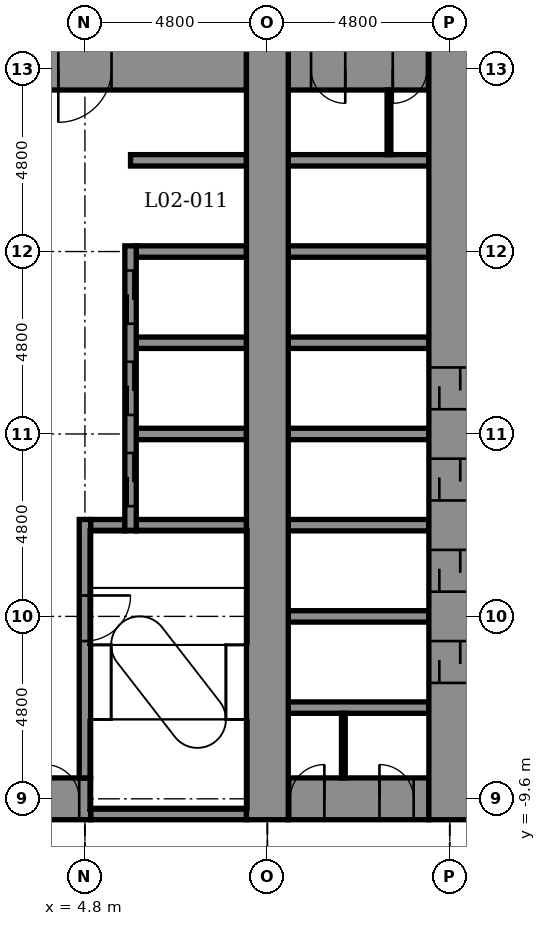
"""IFC4 building model, lengths in metres.
Left out: names, types, materials, properties, quantities, classifications, styles, units other than length and angle.
Written with IfcOpenShell. Run it as: python <this file> out.ifc"""

import sys

from ifc_helpers import new_model, si_unit, direction, frame, frame_2d, origin, place, context, subcontext, project, spatial, rectangle, extrude, element, fill, save


model = new_model("IFC4")
c1 = context("Model", 3, precision=1e-05, world=origin(), true_north=direction((0.0, 1.0)))
c2 = subcontext(c1, "Body", "Model", "MODEL_VIEW")
j1 = project(units=[si_unit("LENGTHUNIT", "METRE"), si_unit("PLANEANGLEUNIT", "RADIAN")], contexts=[c1])
p1 = place(None, origin())
s1 = spatial("IfcSite", under=j1, at=p1, CompositionType="ELEMENT")
p2 = place(p1, origin())
s2 = spatial("IfcBuilding", under=s1, at=p2, CompositionType="ELEMENT")
p3 = place(p2, frame((0.0, 0.0, 12.4)))
s3 = spatial("IfcBuildingStorey", under=s2, at=p3, CompositionType="ELEMENT", Elevation=12.4)
p4 = place(p3, frame((4.95, -10.0, -0.3), z_axis=(0.0, 0.0, 1.0), x_axis=(1.0, 0.0, 0.0)))
e1 = element("IfcWall", 1, at=p4, inside=s3, PredefinedType="STANDARD", context=c2, shape_type="SweptSolid", body=[
    extrude(rectangle(XDim=4.1, YDim=0.3, at=frame_2d((2.05, 0.0))), origin(), (0.0, 0.0, 1.0), 5.05),
])
p5 = place(p3, frame((-5.25, -9.6, -0.3), z_axis=(0.0, 0.0, 1.0), x_axis=(1.0, 0.0, 0.0)))
e2 = element("IfcWall", 2, at=p5, inside=s3, PredefinedType="SHEAR", context=c2, shape_type="SweptSolid", body=[
    extrude(rectangle(XDim=10.2, YDim=1.1, at=frame_2d((5.1, 0.0))), origin(), (0.0, 0.0, 1.0), 5.05),
])
p6 = place(p5, frame((9.0, 0.0, 0.3)))
e3 = element("IfcOpeningElement", 3, at=p6, cuts=e2, PredefinedType="OPENING", context=c2, shape_type="SweptSolid", body=[
    extrude(rectangle(XDim=0.9, YDim=2.1, at=frame_2d((0.45, 1.05))), frame((0.0, 0.56, 0.0), z_axis=(0.0, -1.0, 0.0), x_axis=(1.0, 0.0, 0.0)), (0.0, 0.0, 1.0), 1.12),
])
p7 = place(p3, frame((10.15, -9.6, -0.3), z_axis=(0.0, 0.0, 1.0), x_axis=(1.0, 0.0, 0.0)))
e4 = element("IfcWall", 4, at=p7, inside=s3, PredefinedType="SHEAR", context=c2, shape_type="SweptSolid", body=[
    extrude(rectangle(XDim=3.7, YDim=1.1, at=frame_2d((1.85, 0.0))), origin(), (0.0, 0.0, 1.0), 5.05),
])
p8 = place(p7, frame((0.05, 0.0, 0.3)))
e5 = element("IfcOpeningElement", 5, at=p8, cuts=e4, PredefinedType="OPENING", context=c2, shape_type="SweptSolid", body=[
    extrude(rectangle(XDim=0.9, YDim=2.1, at=frame_2d((0.45, 1.05))), frame((0.0, 0.56, 0.0), z_axis=(0.0, -1.0, 0.0), x_axis=(1.0, 0.0, 0.0)), (0.0, 0.0, 1.0), 1.12),
])
p9 = place(p7, frame((2.4, 0.0, 0.3)))
e6 = element("IfcOpeningElement", 6, at=p9, cuts=e4, PredefinedType="OPENING", context=c2, shape_type="SweptSolid", body=[
    extrude(rectangle(XDim=0.9, YDim=2.1, at=frame_2d((0.45, 1.05))), frame((0.0, 0.56, 0.0), z_axis=(0.0, -1.0, 0.0), x_axis=(1.0, 0.0, 0.0)), (0.0, 0.0, 1.0), 1.12),
])
for number, where, z_axis, x_axis in (
    (7, (10.15, -7.2, -0.3), (0.0, 0.0, 1.0), (1.0, 0.0, 0.0)),
    (8, (10.15, -4.8, -0.3), (0.0, 0.0, 1.0), (1.0, 0.0, 0.0)),
):
    element("IfcWall", number, at=place(p3, frame(where, z_axis=z_axis, x_axis=x_axis)), inside=s3, PredefinedType="STANDARD", context=c2, shape_type="SweptSolid", body=[
        extrude(rectangle(XDim=3.7, YDim=0.3, at=frame_2d((1.85, 0.0))), origin(), (0.0, 0.0, 1.0), 5.05),
    ])
p10 = place(p3, frame((4.95, -2.4, -0.3), z_axis=(0.0, 0.0, 1.0), x_axis=(1.0, 0.0, 0.0)))
e9 = element("IfcWall", 9, at=p10, inside=s3, PredefinedType="STANDARD", context=c2, shape_type="SweptSolid", body=[
    extrude(rectangle(XDim=0.9, YDim=0.3, at=frame_2d((0.45, 0.0))), origin(), (0.0, 0.0, 1.0), 5.05),
])
p11 = place(p3, frame((6.15, -2.4, -0.3), z_axis=(0.0, 0.0, 1.0), x_axis=(1.0, 0.0, 0.0)))
e10 = element("IfcWall", 10, at=p11, inside=s3, PredefinedType="STANDARD", context=c2, shape_type="SweptSolid", body=[
    extrude(rectangle(XDim=2.9, YDim=0.3, at=frame_2d((1.45, 0.0))), origin(), (0.0, 0.0, 1.0), 5.05),
])
p12 = place(p3, frame((10.15, -2.4, -0.3), z_axis=(0.0, 0.0, 1.0), x_axis=(1.0, 0.0, 0.0)))
e11 = element("IfcWall", 11, at=p12, inside=s3, PredefinedType="STANDARD", context=c2, shape_type="SweptSolid", body=[
    extrude(rectangle(XDim=3.7, YDim=0.3, at=frame_2d((1.85, 0.0))), origin(), (0.0, 0.0, 1.0), 5.05),
])
p13 = place(p3, frame((6.15, 0.0, -0.3), z_axis=(0.0, 0.0, 1.0), x_axis=(1.0, 0.0, 0.0)))
e12 = element("IfcWall", 12, at=p13, inside=s3, PredefinedType="STANDARD", context=c2, shape_type="SweptSolid", body=[
    extrude(rectangle(XDim=2.9, YDim=0.3, at=frame_2d((1.45, 0.0))), origin(), (0.0, 0.0, 1.0), 5.05),
])
p14 = place(p3, frame((10.15, 0.0, -0.3), z_axis=(0.0, 0.0, 1.0), x_axis=(1.0, 0.0, 0.0)))
e13 = element("IfcWall", 13, at=p14, inside=s3, PredefinedType="STANDARD", context=c2, shape_type="SweptSolid", body=[
    extrude(rectangle(XDim=3.7, YDim=0.3, at=frame_2d((1.85, 0.0))), origin(), (0.0, 0.0, 1.0), 5.05),
])
p15 = place(p3, frame((6.15, 2.4, -0.3), z_axis=(0.0, 0.0, 1.0), x_axis=(1.0, 0.0, 0.0)))
e14 = element("IfcWall", 14, at=p15, inside=s3, PredefinedType="STANDARD", context=c2, shape_type="SweptSolid", body=[
    extrude(rectangle(XDim=2.9, YDim=0.3, at=frame_2d((1.45, 0.0))), origin(), (0.0, 0.0, 1.0), 5.05),
])
p16 = place(p3, frame((10.15, 2.4, -0.3), z_axis=(0.0, 0.0, 1.0), x_axis=(1.0, 0.0, 0.0)))
e15 = element("IfcWall", 15, at=p16, inside=s3, PredefinedType="STANDARD", context=c2, shape_type="SweptSolid", body=[
    extrude(rectangle(XDim=3.7, YDim=0.3, at=frame_2d((1.85, 0.0))), origin(), (0.0, 0.0, 1.0), 5.05),
])
p17 = place(p3, frame((6.15, 4.8, -0.3), z_axis=(0.0, 0.0, 1.0), x_axis=(1.0, 0.0, 0.0)))
e16 = element("IfcWall", 16, at=p17, inside=s3, PredefinedType="STANDARD", context=c2, shape_type="SweptSolid", body=[
    extrude(rectangle(XDim=2.9, YDim=0.3, at=frame_2d((1.45, 0.0))), origin(), (0.0, 0.0, 1.0), 5.05),
])
p18 = place(p3, frame((10.15, 4.8, -0.3), z_axis=(0.0, 0.0, 1.0), x_axis=(1.0, 0.0, 0.0)))
e17 = element("IfcWall", 17, at=p18, inside=s3, PredefinedType="STANDARD", context=c2, shape_type="SweptSolid", body=[
    extrude(rectangle(XDim=3.7, YDim=0.3, at=frame_2d((1.85, 0.0))), origin(), (0.0, 0.0, 1.0), 5.05),
])
p19 = place(p3, frame((6.0, 7.2, -0.3), z_axis=(0.0, 0.0, 1.0), x_axis=(1.0, 0.0, 0.0)))
e18 = element("IfcWall", 18, at=p19, inside=s3, PredefinedType="STANDARD", context=c2, shape_type="SweptSolid", body=[
    extrude(rectangle(XDim=3.05, YDim=0.3, at=frame_2d((1.525, 0.0))), origin(), (0.0, 0.0, 1.0), 5.05),
])
p20 = place(p3, frame((10.15, 7.2, -0.3), z_axis=(0.0, 0.0, 1.0), x_axis=(1.0, 0.0, 0.0)))
e19 = element("IfcWall", 19, at=p20, inside=s3, PredefinedType="STANDARD", context=c2, shape_type="SweptSolid", body=[
    extrude(rectangle(XDim=3.7, YDim=0.3, at=frame_2d((1.85, 0.0))), origin(), (0.0, 0.0, 1.0), 5.05),
])
p21 = place(p3, frame((-5.25, 9.6, -0.3), z_axis=(0.0, 0.0, 1.0), x_axis=(1.0, 0.0, 0.0)))
e20 = element("IfcWall", 20, at=p21, inside=s3, PredefinedType="SHEAR", context=c2, shape_type="SweptSolid", body=[
    extrude(rectangle(XDim=14.3, YDim=1.1, at=frame_2d((7.15, 0.0))), origin(), (0.0, 0.0, 1.0), 5.05),
])
p22 = place(p21, frame((9.35, 0.0, 0.3)))
e21 = element("IfcOpeningElement", 21, at=p22, cuts=e20, PredefinedType="OPENING", context=c2, shape_type="SweptSolid", body=[
    extrude(rectangle(XDim=1.4, YDim=2.1, at=frame_2d((0.7, 1.05))), frame((0.0, 0.56, 0.0), z_axis=(0.0, -1.0, 0.0), x_axis=(1.0, 0.0, 0.0)), (0.0, 0.0, 1.0), 1.12),
])
p23 = place(p3, frame((10.15, 9.6, -0.3), z_axis=(0.0, 0.0, 1.0), x_axis=(1.0, 0.0, 0.0)))
e22 = element("IfcWall", 22, at=p23, inside=s3, PredefinedType="SHEAR", context=c2, shape_type="SweptSolid", body=[
    extrude(rectangle(XDim=3.7, YDim=1.1, at=frame_2d((1.85, 0.0))), origin(), (0.0, 0.0, 1.0), 5.05),
])
p24 = place(p23, frame((0.6, 0.0, 0.3)))
e23 = element("IfcOpeningElement", 23, at=p24, cuts=e22, PredefinedType="OPENING", context=c2, shape_type="SweptSolid", body=[
    extrude(rectangle(XDim=0.9, YDim=2.1, at=frame_2d((0.45, 1.05))), frame((0.0, 0.56, 0.0), z_axis=(0.0, -1.0, 0.0), x_axis=(1.0, 0.0, 0.0)), (0.0, 0.0, 1.0), 1.12),
])
p25 = place(p23, frame((2.75, 0.0, 0.3)))
e24 = element("IfcOpeningElement", 24, at=p25, cuts=e22, PredefinedType="OPENING", context=c2, shape_type="SweptSolid", body=[
    extrude(rectangle(XDim=0.9, YDim=2.1, at=frame_2d((0.45, 1.05))), frame((0.0, 0.56, 0.0), z_axis=(0.0, -1.0, 0.0), x_axis=(1.0, 0.0, 0.0)), (0.0, 0.0, 1.0), 1.12),
])
p26 = place(p3, frame((4.8, -9.05, -0.3), z_axis=(0.0, 0.0, 1.0), x_axis=(0.0, 1.0, 0.0)))
e25 = element("IfcWall", 25, at=p26, inside=s3, PredefinedType="STANDARD", context=c2, shape_type="SweptSolid", body=[
    extrude(rectangle(XDim=6.8, YDim=0.3, at=frame_2d((3.4, 0.0))), origin(), (0.0, 0.0, 1.0), 5.05),
])
p27 = place(p26, frame((3.6, 0.0, 0.3)))
e26 = element("IfcOpeningElement", 26, at=p27, cuts=e25, PredefinedType="OPENING", context=c2, shape_type="SweptSolid", body=[
    extrude(rectangle(XDim=1.2, YDim=2.1, at=frame_2d((0.6, 1.05))), frame((0.0, 0.16, 0.0), z_axis=(0.0, -1.0, 0.0), x_axis=(1.0, 0.0, 0.0)), (0.0, 0.0, 1.0), 0.32),
])
p28 = place(p3, frame((6.0, -2.55, -0.3), z_axis=(0.0, 0.0, 1.0), x_axis=(0.0, 1.0, 0.0)))
e27 = element("IfcWall", 27, at=p28, inside=s3, PredefinedType="STANDARD", context=c2, shape_type="SweptSolid", body=[
    extrude(rectangle(XDim=7.5, YDim=0.3, at=frame_2d((3.75, 0.0))), origin(), (0.0, 0.0, 1.0), 5.05),
])
p29 = place(p28, frame((0.65, 0.0, 0.3)))
e28 = element("IfcOpeningElement", 28, at=p29, cuts=e27, PredefinedType="OPENING", context=c2, shape_type="SweptSolid", body=[
    extrude(rectangle(XDim=1.4, YDim=2.1, at=frame_2d((0.7, 1.05))), frame((0.0, 0.16, 0.0), z_axis=(0.0, -1.0, 0.0), x_axis=(1.0, 0.0, 0.0)), (0.0, 0.0, 1.0), 0.32),
])
p30 = place(p28, frame((3.05, 0.0, 0.3)))
e29 = element("IfcOpeningElement", 29, at=p30, cuts=e27, PredefinedType="OPENING", context=c2, shape_type="SweptSolid", body=[
    extrude(rectangle(XDim=1.4, YDim=2.1, at=frame_2d((0.7, 1.05))), frame((0.0, 0.16, 0.0), z_axis=(0.0, -1.0, 0.0), x_axis=(1.0, 0.0, 0.0)), (0.0, 0.0, 1.0), 0.32),
])
p31 = place(p28, frame((5.45, 0.0, 0.3)))
e30 = element("IfcOpeningElement", 30, at=p31, cuts=e27, PredefinedType="OPENING", context=c2, shape_type="SweptSolid", body=[
    extrude(rectangle(XDim=1.4, YDim=2.1, at=frame_2d((0.7, 1.05))), frame((0.0, 0.16, 0.0), z_axis=(0.0, -1.0, 0.0), x_axis=(1.0, 0.0, 0.0)), (0.0, 0.0, 1.0), 0.32),
])
p32 = place(p3, frame((9.6, -10.15, -0.3), z_axis=(0.0, 0.0, 1.0), x_axis=(0.0, 1.0, 0.0)))
e31 = element("IfcWall", 31, at=p32, inside=s3, PredefinedType="SHEAR", context=c2, shape_type="SweptSolid", body=[
    extrude(rectangle(XDim=20.3, YDim=1.1, at=frame_2d((10.15, 0.0))), origin(), (0.0, 0.0, 1.0), 5.05),
])
p33 = place(p3, frame((14.4, -10.15, -0.3), z_axis=(0.0, 0.0, 1.0), x_axis=(0.0, 1.0, 0.0)))
e32 = element("IfcWall", 32, at=p33, inside=s3, PredefinedType="SHEAR", context=c2, shape_type="SweptSolid", body=[
    extrude(rectangle(XDim=20.3, YDim=1.1, at=frame_2d((10.15, 0.0))), origin(), (0.0, 0.0, 1.0), 5.05),
])
p34 = place(p33, frame((3.6, 0.0, 0.3)))
e33 = element("IfcOpeningElement", 33, at=p34, cuts=e32, PredefinedType="OPENING", context=c2, shape_type="SweptSolid", body=[
    extrude(rectangle(XDim=1.1, YDim=2.1, at=frame_2d((0.55, 1.05))), frame((0.0, 0.56, 0.0), z_axis=(0.0, -1.0, 0.0), x_axis=(1.0, 0.0, 0.0)), (0.0, 0.0, 1.0), 1.12),
])
p35 = place(p33, frame((6.0, 0.0, 0.3)))
e34 = element("IfcOpeningElement", 34, at=p35, cuts=e32, PredefinedType="OPENING", context=c2, shape_type="SweptSolid", body=[
    extrude(rectangle(XDim=1.1, YDim=2.1, at=frame_2d((0.55, 1.05))), frame((0.0, 0.56, 0.0), z_axis=(0.0, -1.0, 0.0), x_axis=(1.0, 0.0, 0.0)), (0.0, 0.0, 1.0), 1.12),
])
p36 = place(p33, frame((8.4, 0.0, 0.3)))
e35 = element("IfcOpeningElement", 35, at=p36, cuts=e32, PredefinedType="OPENING", context=c2, shape_type="SweptSolid", body=[
    extrude(rectangle(XDim=1.1, YDim=2.1, at=frame_2d((0.55, 1.05))), frame((0.0, 0.56, 0.0), z_axis=(0.0, -1.0, 0.0), x_axis=(1.0, 0.0, 0.0)), (0.0, 0.0, 1.0), 1.12),
])
p37 = place(p33, frame((10.8, 0.0, 0.3)))
e36 = element("IfcOpeningElement", 36, at=p37, cuts=e32, PredefinedType="OPENING", context=c2, shape_type="SweptSolid", body=[
    extrude(rectangle(XDim=1.1, YDim=2.1, at=frame_2d((0.55, 1.05))), frame((0.0, 0.56, 0.0), z_axis=(0.0, -1.0, 0.0), x_axis=(1.0, 0.0, 0.0)), (0.0, 0.0, 1.0), 1.12),
])
for number, where, z_axis, x_axis in (
    (37, (12.8, 7.35, 0.0), (0.0, 0.0, 1.0), (0.0, 1.0, 0.0)),
    (38, (11.6, -9.05, 0.0), (0.0, 0.0, 1.0), (0.0, 1.0, 0.0)),
):
    element("IfcWall", number, at=place(p3, frame(where, z_axis=z_axis, x_axis=x_axis)), inside=s3, PredefinedType="PARTITIONING", context=c2, shape_type="SweptSolid", body=[
        extrude(rectangle(XDim=1.7, YDim=0.1, at=frame_2d((0.85, 0.0))), origin(), (0.0, 0.0, 1.0), 4.7),
    ])
p38 = place(p29, origin())
e39 = element("IfcDoor", 39, at=p38, inside=s3, OperationType="DOUBLE_DOOR_SLIDING", PredefinedType="DOOR", context=c2, shape_type="SweptSolid", body=[
    extrude(rectangle(XDim=1.4, YDim=2.1, at=frame_2d((0.7, 1.05))), frame((0.0, 0.025, 0.0), z_axis=(0.0, -1.0, 0.0), x_axis=(1.0, 0.0, 0.0)), (0.0, 0.0, 1.0), 0.05),
])
fill(e28, e39)
p39 = place(p30, origin())
e40 = element("IfcDoor", 40, at=p39, inside=s3, OperationType="DOUBLE_DOOR_SLIDING", PredefinedType="DOOR", context=c2, shape_type="SweptSolid", body=[
    extrude(rectangle(XDim=1.4, YDim=2.1, at=frame_2d((0.7, 1.05))), frame((0.0, 0.025, 0.0), z_axis=(0.0, -1.0, 0.0), x_axis=(1.0, 0.0, 0.0)), (0.0, 0.0, 1.0), 0.05),
])
fill(e29, e40)
p40 = place(p31, origin())
e41 = element("IfcDoor", 41, at=p40, inside=s3, OperationType="DOUBLE_DOOR_SLIDING", PredefinedType="DOOR", context=c2, shape_type="SweptSolid", body=[
    extrude(rectangle(XDim=1.4, YDim=2.1, at=frame_2d((0.7, 1.05))), frame((0.0, 0.025, 0.0), z_axis=(0.0, -1.0, 0.0), x_axis=(1.0, 0.0, 0.0)), (0.0, 0.0, 1.0), 0.05),
])
fill(e30, e41)
p41 = place(p34, origin())
e42 = element("IfcDoor", 42, at=p41, inside=s3, OperationType="DOUBLE_DOOR_SLIDING", PredefinedType="DOOR", context=c2, shape_type="SweptSolid", body=[
    extrude(rectangle(XDim=1.1, YDim=2.1, at=frame_2d((0.55, 1.05))), frame((0.0, 0.025, 0.0), z_axis=(0.0, -1.0, 0.0), x_axis=(1.0, 0.0, 0.0)), (0.0, 0.0, 1.0), 0.05),
])
fill(e33, e42)
p42 = place(p35, origin())
e43 = element("IfcDoor", 43, at=p42, inside=s3, OperationType="DOUBLE_DOOR_SLIDING", PredefinedType="DOOR", context=c2, shape_type="SweptSolid", body=[
    extrude(rectangle(XDim=1.1, YDim=2.1, at=frame_2d((0.55, 1.05))), frame((0.0, 0.025, 0.0), z_axis=(0.0, -1.0, 0.0), x_axis=(1.0, 0.0, 0.0)), (0.0, 0.0, 1.0), 0.05),
])
fill(e34, e43)
p43 = place(p36, origin())
e44 = element("IfcDoor", 44, at=p43, inside=s3, OperationType="DOUBLE_DOOR_SLIDING", PredefinedType="DOOR", context=c2, shape_type="SweptSolid", body=[
    extrude(rectangle(XDim=1.1, YDim=2.1, at=frame_2d((0.55, 1.05))), frame((0.0, 0.025, 0.0), z_axis=(0.0, -1.0, 0.0), x_axis=(1.0, 0.0, 0.0)), (0.0, 0.0, 1.0), 0.05),
])
fill(e35, e44)
p44 = place(p37, origin())
e45 = element("IfcDoor", 45, at=p44, inside=s3, OperationType="DOUBLE_DOOR_SLIDING", PredefinedType="DOOR", context=c2, shape_type="SweptSolid", body=[
    extrude(rectangle(XDim=1.1, YDim=2.1, at=frame_2d((0.55, 1.05))), frame((0.0, 0.025, 0.0), z_axis=(0.0, -1.0, 0.0), x_axis=(1.0, 0.0, 0.0)), (0.0, 0.0, 1.0), 0.05),
])
fill(e36, e45)
p45 = place(p27, frame((1.2, 0.0, 0.0), z_axis=(0.0, 0.0, 1.0), x_axis=(-1.0, 0.0, 0.0)))
e46 = element("IfcDoor", 46, at=p45, inside=s3, OperationType="SINGLE_SWING_RIGHT", PredefinedType="DOOR", context=c2, shape_type="SweptSolid", body=[
    extrude(rectangle(XDim=1.2, YDim=2.1, at=frame_2d((0.6, 1.05))), frame((0.0, 0.025, 0.0), z_axis=(0.0, -1.0, 0.0), x_axis=(1.0, 0.0, 0.0)), (0.0, 0.0, 1.0), 0.05),
])
fill(e26, e46)
p46 = place(p8, origin())
e47 = element("IfcDoor", 47, at=p46, inside=s3, OperationType="SINGLE_SWING_RIGHT", PredefinedType="DOOR", context=c2, shape_type="SweptSolid", body=[
    extrude(rectangle(XDim=0.9, YDim=2.1, at=frame_2d((0.45, 1.05))), frame((0.0, 0.025, 0.0), z_axis=(0.0, -1.0, 0.0), x_axis=(1.0, 0.0, 0.0)), (0.0, 0.0, 1.0), 0.05),
])
fill(e5, e47)
p47 = place(p9, origin())
e48 = element("IfcDoor", 48, at=p47, inside=s3, OperationType="SINGLE_SWING_LEFT", PredefinedType="DOOR", context=c2, shape_type="SweptSolid", body=[
    extrude(rectangle(XDim=0.9, YDim=2.1, at=frame_2d((0.45, 1.05))), frame((0.0, 0.025, 0.0), z_axis=(0.0, -1.0, 0.0), x_axis=(1.0, 0.0, 0.0)), (0.0, 0.0, 1.0), 0.05),
])
fill(e6, e48)
p48 = place(p24, frame((0.9, 0.0, 0.0), z_axis=(0.0, 0.0, 1.0), x_axis=(-1.0, 0.0, 0.0)))
e49 = element("IfcDoor", 49, at=p48, inside=s3, OperationType="SINGLE_SWING_RIGHT", PredefinedType="DOOR", context=c2, shape_type="SweptSolid", body=[
    extrude(rectangle(XDim=0.9, YDim=2.1, at=frame_2d((0.45, 1.05))), frame((0.0, 0.025, 0.0), z_axis=(0.0, -1.0, 0.0), x_axis=(1.0, 0.0, 0.0)), (0.0, 0.0, 1.0), 0.05),
])
fill(e23, e49)
p49 = place(p25, frame((0.9, 0.0, 0.0), z_axis=(0.0, 0.0, 1.0), x_axis=(-1.0, 0.0, 0.0)))
e50 = element("IfcDoor", 50, at=p49, inside=s3, OperationType="SINGLE_SWING_LEFT", PredefinedType="DOOR", context=c2, shape_type="SweptSolid", body=[
    extrude(rectangle(XDim=0.9, YDim=2.1, at=frame_2d((0.45, 1.05))), frame((0.0, 0.025, 0.0), z_axis=(0.0, -1.0, 0.0), x_axis=(1.0, 0.0, 0.0)), (0.0, 0.0, 1.0), 0.05),
])
fill(e24, e50)
p50 = place(p22, frame((1.4, 0.0, 0.0), z_axis=(0.0, 0.0, 1.0), x_axis=(-1.0, 0.0, 0.0)))
e51 = element("IfcDoor", 51, at=p50, inside=s3, OperationType="SINGLE_SWING_LEFT", PredefinedType="DOOR", context=c2, shape_type="SweptSolid", body=[
    extrude(rectangle(XDim=1.4, YDim=2.1, at=frame_2d((0.7, 1.05))), frame((0.0, 0.025, 0.0), z_axis=(0.0, -1.0, 0.0), x_axis=(1.0, 0.0, 0.0)), (0.0, 0.0, 1.0), 0.05),
])
fill(e21, e51)
p51 = place(p6, origin())
e52 = element("IfcDoor", 52, at=p51, inside=s3, OperationType="SINGLE_SWING_LEFT", PredefinedType="DOOR", context=c2, shape_type="SweptSolid", body=[
    extrude(rectangle(XDim=0.9, YDim=2.1, at=frame_2d((0.45, 1.05))), frame((0.0, 0.025, 0.0), z_axis=(0.0, -1.0, 0.0), x_axis=(1.0, 0.0, 0.0)), (0.0, 0.0, 1.0), 0.05),
])
fill(e3, e52)
save(model, sys.argv[1])
